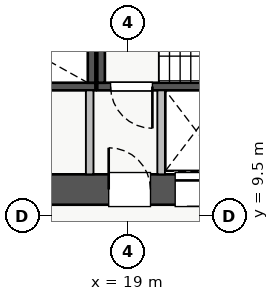
"""IFC4 building model, lengths in metres.
Left out: names, types, materials, properties, quantities, classifications, styles, units other than length and angle.
Written with IfcOpenShell. Run it as: python <this file> out.ifc"""

import sys

from ifc_helpers import new_model, si_unit, direction, frame, frame_2d, origin, place, context, subcontext, project, spatial, rectangle, extrude, source, transform, mapped, element, fill, save


model = new_model("IFC4")
c1 = context("Model", 3, precision=1e-05, world=origin(), true_north=direction((0.0, 1.0)))
c2 = subcontext(c1, "Body", "Model", "MODEL_VIEW")
j1 = project(units=[si_unit("LENGTHUNIT", "METRE"), si_unit("PLANEANGLEUNIT", "RADIAN")], contexts=[c1])
p1 = place(None, origin())
s1 = spatial("IfcSite", under=j1, at=p1, CompositionType="ELEMENT")
p2 = place(p1, origin())
s2 = spatial("IfcBuilding", under=s1, at=p2, CompositionType="ELEMENT")
p3 = place(p2, frame((0.0, 0.0, 66.5)))
s3 = spatial("IfcBuildingStorey", under=s2, at=p3, CompositionType="ELEMENT", Elevation=66.5)
p4 = place(p3, frame((19.88, 12.8, 0.0), z_axis=(0.0, 0.0, 1.0), x_axis=(1.0, 0.0, 0.0)))
e1 = element("IfcWall", 1, at=p4, inside=s3, PredefinedType="SHEAR", context=c2, shape_type="SweptSolid", body=[
    extrude(rectangle(XDim=1.87, YDim=0.18, at=frame_2d((0.935, 0.0))), origin(), (0.0, 0.0, 1.0), 3.07),
])
p5 = place(p3, frame((11.0, 12.91, 0.0), z_axis=(0.0, 0.0, 1.0), x_axis=(1.0, 0.0, 0.0)))
e2 = element("IfcWall", 2, at=p5, inside=s3, PredefinedType="SHEAR", context=c2, shape_type="SweptSolid", body=[
    extrude(rectangle(XDim=7.15, YDim=0.2, at=frame_2d((3.575, 0.0))), origin(), (0.0, 0.0, 1.0), 3.25),
])
p6 = place(p5, frame((0.35, 0.0, 0.0)))
e3 = element("IfcOpeningElement", 3, at=p6, cuts=e2, PredefinedType="OPENING", context=c2, shape_type="SweptSolid", body=[
    extrude(rectangle(XDim=1.1, YDim=2.05, at=frame_2d((0.55, 1.025))), frame((0.0, 0.11, 0.0), z_axis=(0.0, -1.0, 0.0), x_axis=(1.0, 0.0, 0.0)), (0.0, 0.0, 1.0), 0.22),
])
p7 = place(p3, frame((18.05, 13.01, 0.0), z_axis=(0.0, 0.0, 1.0), x_axis=(0.0, 1.0, 0.0)))
e4 = element("IfcWall", 4, at=p7, inside=s3, PredefinedType="SHEAR", context=c2, shape_type="SweptSolid", body=[
    extrude(rectangle(XDim=2.94, YDim=0.2, at=frame_2d((1.47, 0.0))), origin(), (0.0, 0.0, 1.0), 3.25),
])
p8 = place(p3, frame((18.2, 12.91, 0.0), z_axis=(0.0, 0.0, 1.0), x_axis=(1.0, 0.0, 0.0)))
e5 = element("IfcWall", 5, at=p8, inside=s3, PredefinedType="SHEAR", context=c2, shape_type="SweptSolid", body=[
    extrude(rectangle(XDim=7.15, YDim=0.2, at=frame_2d((3.575, 0.0))), origin(), (0.0, 0.0, 1.0), 3.25),
])
p9 = place(p8, frame((0.35, 0.0, 0.0)))
e6 = element("IfcOpeningElement", 6, at=p9, cuts=e5, PredefinedType="OPENING", context=c2, shape_type="SweptSolid", body=[
    extrude(rectangle(XDim=1.1, YDim=2.05, at=frame_2d((0.55, 1.025))), frame((0.0, 0.11, 0.0), z_axis=(0.0, -1.0, 0.0), x_axis=(1.0, 0.0, 0.0)), (0.0, 0.0, 1.0), 0.22),
])
p10 = place(p3, frame((18.3, 13.01, 0.0), z_axis=(0.0, 0.0, 1.0), x_axis=(0.0, 1.0, 0.0)))
e7 = element("IfcWall", 7, at=p10, inside=s3, PredefinedType="SHEAR", context=c2, shape_type="SweptSolid", body=[
    extrude(rectangle(XDim=2.94, YDim=0.2, at=frame_2d((1.47, 0.0))), origin(), (0.0, 0.0, 1.0), 3.25),
])
p11 = place(p3, frame((10.2, 10.2, 0.0), z_axis=(0.0, 0.0, 1.0), x_axis=(1.0, 0.0, 0.0)))
e8 = element("IfcWall", 8, at=p11, inside=s3, PredefinedType="SHEAR", context=c2, shape_type="SweptSolid", body=[
    extrude(rectangle(XDim=17.6, YDim=0.8, at=frame_2d((8.8, 0.0))), origin(), (0.0, 0.0, 1.0), 3.25),
])
p12 = place(p11, frame((1.15, 0.0, 0.0)))
e9 = element("IfcOpeningElement", 9, at=p12, cuts=e8, PredefinedType="OPENING", context=c2, shape_type="SweptSolid", body=[
    extrude(rectangle(XDim=1.1, YDim=2.05, at=frame_2d((0.55, 1.025))), frame((0.0, 0.41, 0.0), z_axis=(0.0, -1.0, 0.0), x_axis=(1.0, 0.0, 0.0)), (0.0, 0.0, 1.0), 0.82),
])
p13 = place(p11, frame((8.3, 0.0, 0.0)))
e10 = element("IfcOpeningElement", 10, at=p13, cuts=e8, PredefinedType="OPENING", context=c2, shape_type="SweptSolid", body=[
    extrude(rectangle(XDim=1.1, YDim=2.05, at=frame_2d((0.55, 1.025))), frame((0.0, 0.41, 0.0), z_axis=(0.0, -1.0, 0.0), x_axis=(1.0, 0.0, 0.0)), (0.0, 0.0, 1.0), 0.82),
])
p14 = place(p11, frame((10.05, 0.0, 0.0)))
e11 = element("IfcOpeningElement", 11, at=p14, cuts=e8, PredefinedType="OPENING", context=c2, shape_type="SweptSolid", body=[
    extrude(rectangle(XDim=1.1, YDim=2.05, at=frame_2d((0.55, 1.025))), frame((0.0, 0.41, 0.0), z_axis=(0.0, -1.0, 0.0), x_axis=(1.0, 0.0, 0.0)), (0.0, 0.0, 1.0), 0.82),
])
p15 = place(p11, frame((14.74, 0.0, 0.0)))
e12 = element("IfcOpeningElement", 12, at=p15, cuts=e8, PredefinedType="OPENING", context=c2, shape_type="SweptSolid", body=[
    extrude(rectangle(XDim=1.0, YDim=2.05, at=frame_2d((0.5, 1.025))), frame((0.0, 0.41, 0.0), z_axis=(0.0, -1.0, 0.0), x_axis=(1.0, 0.0, 0.0)), (0.0, 0.0, 1.0), 0.82),
])
p16 = place(p11, frame((11.945, 0.0, 0.0)))
e13 = element("IfcOpeningElement", 13, at=p16, cuts=e8, PredefinedType="OPENING", context=c2, shape_type="SweptSolid", body=[
    extrude(rectangle(XDim=1.0, YDim=2.05, at=frame_2d((0.5, 1.025))), frame((0.0, 0.41, 0.0), z_axis=(0.0, -1.0, 0.0), x_axis=(1.0, 0.0, 0.0)), (0.0, 0.0, 1.0), 0.82),
])
p17 = place(p11, frame((13.48, 0.0, 0.0)))
e14 = element("IfcOpeningElement", 14, at=p17, cuts=e8, PredefinedType="OPENING", context=c2, shape_type="SweptSolid", body=[
    extrude(rectangle(XDim=1.0, YDim=2.05, at=frame_2d((0.5, 1.025))), frame((0.0, 0.41, 0.0), z_axis=(0.0, -1.0, 0.0), x_axis=(1.0, 0.0, 0.0)), (0.0, 0.0, 1.0), 0.82),
])
for number, where, z_axis, x_axis in (
    (15, (18.0, 10.6, 0.0), (0.0, 0.0, 1.0), (0.0, 1.0, 0.0)),
    (16, (19.88, 10.6, 0.0), (0.0, 0.0, 1.0), (0.0, 1.0, 0.0)),
):
    element("IfcWall", number, at=place(p3, frame(where, z_axis=z_axis, x_axis=x_axis)), inside=s3, PredefinedType="PARTITIONING", context=c2, shape_type="SweptSolid", body=[
        extrude(rectangle(XDim=2.21, YDim=0.2, at=frame_2d((1.105, 0.0))), origin(), (0.0, 0.0, 1.0), 3.07),
    ])
m1 = source(origin(), c2, "Body", "SweptSolid", [
    extrude(rectangle(XDim=1.1, YDim=2.05, at=frame_2d((0.55, 1.025))), frame((0.0, 0.025, 0.0), z_axis=(0.0, -1.0, 0.0), x_axis=(1.0, 0.0, 0.0)), (0.0, 0.0, 1.0), 0.05),
])
p18 = place(p13, origin())
e17 = element("IfcDoor", 17, at=p18, inside=s3, OperationType="SINGLE_SWING_LEFT", PredefinedType="DOOR", context=c2, shape_type="MappedRepresentation", body=[
    mapped(m1, transform((0.0, 0.0, 0.0), x_axis=(1.0, 0.0, 0.0), y_axis=(0.0, 1.0, 0.0), z_axis=(0.0, 0.0, 1.0), scale=1.0)),
])
fill(e10, e17)
p19 = place(p9, frame((1.1, 0.0, 0.0), z_axis=(0.0, 0.0, 1.0), x_axis=(-1.0, 0.0, 0.0)))
e18 = element("IfcDoor", 18, at=p19, inside=s3, OperationType="SINGLE_SWING_RIGHT", PredefinedType="DOOR", context=c2, shape_type="MappedRepresentation", body=[
    mapped(m1, transform((0.0, 0.0, 0.0), x_axis=(1.0, 0.0, 0.0), y_axis=(0.0, 1.0, 0.0), z_axis=(0.0, 0.0, 1.0), scale=1.0)),
])
fill(e6, e18)
p20 = place(p14, origin())
e19 = element("IfcDoor", 19, at=p20, inside=s3, OperationType="SLIDING_TO_RIGHT", PredefinedType="DOOR", context=c2, shape_type="MappedRepresentation", body=[
    mapped(m1, transform((0.0, 0.0, 0.0), x_axis=(1.0, 0.0, 0.0), y_axis=(0.0, 1.0, 0.0), z_axis=(0.0, 0.0, 1.0), scale=1.0)),
])
fill(e11, e19)
save(model, sys.argv[1])
